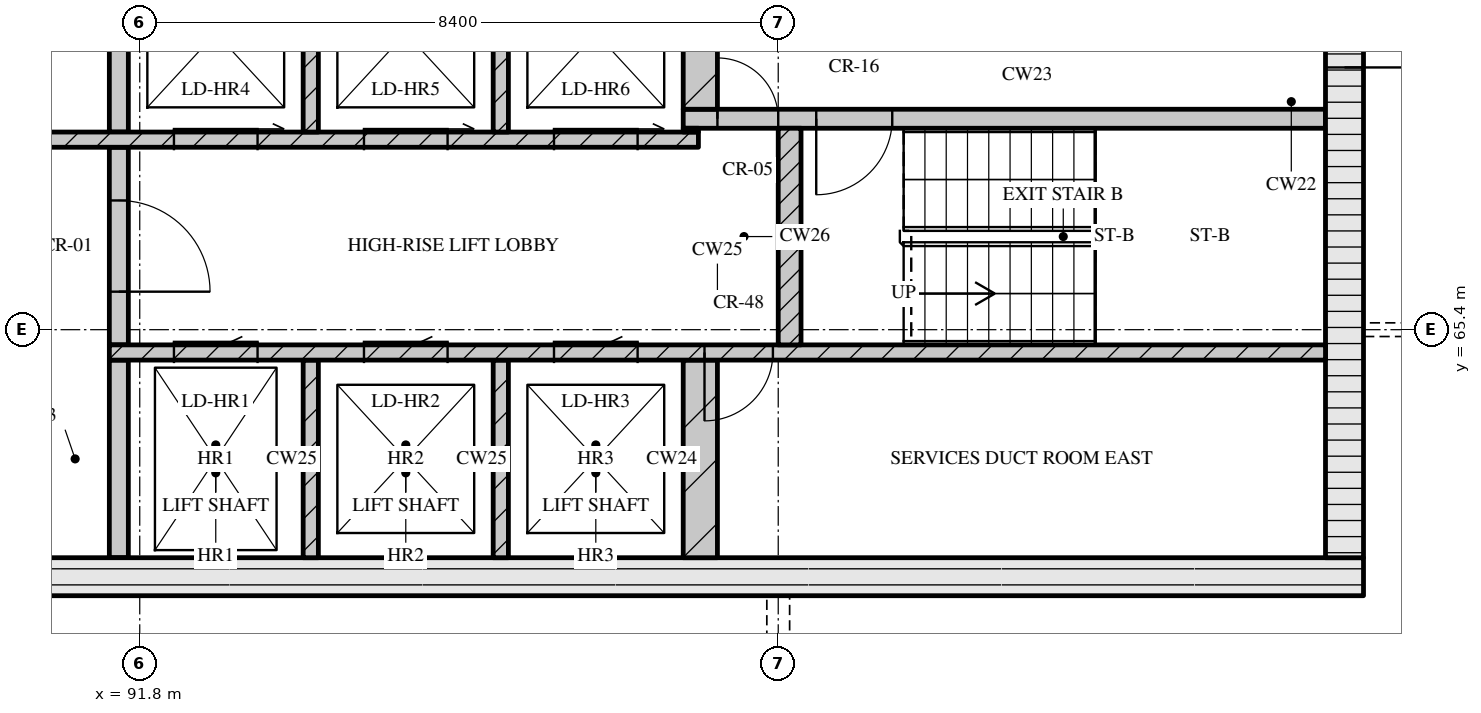
"""IFC4 building model, lengths in metres.
Left out: names, types, materials, properties, quantities, classifications, styles, units other than length and angle.
Written with IfcOpenShell. Run it as: python <this file> out.ifc"""

import sys

from ifc_helpers import new_model, si_unit, direction, frame, frame_2d, origin, place, context, subcontext, project, spatial, rectangle, extrude, element, fill, save


model = new_model("IFC4")
c1 = context("Model", 3, precision=1e-05, world=origin(), true_north=direction((0.0, 1.0)))
c2 = subcontext(c1, "Body", "Model", "MODEL_VIEW")
j1 = project(units=[si_unit("LENGTHUNIT", "METRE"), si_unit("PLANEANGLEUNIT", "RADIAN")], contexts=[c1])
p1 = place(None, origin())
s1 = spatial("IfcSite", under=j1, at=p1, CompositionType="ELEMENT")
p2 = place(p1, origin())
s2 = spatial("IfcBuilding", under=s1, at=p2, CompositionType="ELEMENT")
p3 = place(p2, frame((0.0, 0.0, 303.15)))
s3 = spatial("IfcBuildingStorey", under=s2, at=p3, CompositionType="ELEMENT", Elevation=303.15)
p4 = place(p3, frame((67.3, 62.15, 0.0), z_axis=(0.0, 0.0, 1.0), x_axis=(1.0, 0.0, 0.0)))
e1 = element("IfcWall", 1, at=p4, inside=s3, PredefinedType="SOLIDWALL", context=c2, shape_type="SweptSolid", body=[
    extrude(rectangle(XDim=40.6, YDim=0.5, at=frame_2d((20.3, 0.0))), origin(), (0.0, 0.0, 1.0), 3.32),
])
p5 = place(p4, frame((20.65, 0.0, 0.0)))
e2 = element("IfcOpeningElement", 2, at=p5, cuts=e1, PredefinedType="OPENING", context=c2, shape_type="SweptSolid", body=[
    extrude(rectangle(XDim=1.8, YDim=2.1, at=frame_2d((0.9, 1.05))), frame((0.0, 0.26, 0.0), z_axis=(0.0, -1.0, 0.0), x_axis=(1.0, 0.0, 0.0)), (0.0, 0.0, 1.0), 0.52),
])
p6 = place(p3, frame((107.65, 62.4, 0.0), z_axis=(0.0, 0.0, 1.0), x_axis=(0.0, 1.0, 0.0)))
e3 = element("IfcWall", 3, at=p6, inside=s3, PredefinedType="SOLIDWALL", context=c2, shape_type="SweptSolid", body=[
    extrude(rectangle(XDim=12.0, YDim=0.5, at=frame_2d((6.0, 0.0))), origin(), (0.0, 0.0, 1.0), 3.32),
])
p7 = place(p6, frame((6.45, 0.0, 0.0)))
e4 = element("IfcOpeningElement", 4, at=p7, cuts=e3, PredefinedType="OPENING", context=c2, shape_type="SweptSolid", body=[
    extrude(rectangle(XDim=1.2, YDim=2.1, at=frame_2d((0.6, 1.05))), frame((0.0, 0.26, 0.0), z_axis=(0.0, -1.0, 0.0), x_axis=(1.0, 0.0, 0.0)), (0.0, 0.0, 1.0), 0.52),
])
p8 = place(p3, frame((91.525, 62.4, 0.0), z_axis=(0.0, 0.0, 1.0), x_axis=(0.0, 1.0, 0.0)))
e5 = element("IfcWall", 5, at=p8, inside=s3, PredefinedType="SOLIDWALL", context=c2, shape_type="SweptSolid", body=[
    extrude(rectangle(XDim=2.6, YDim=0.25, at=frame_2d((1.3, 0.0))), origin(), (0.0, 0.0, 1.0), 3.32),
])
for number, where, z_axis, x_axis in (
    (6, (94.05, 62.4, 0.0), (0.0, 0.0, 1.0), (0.0, 1.0, 0.0)),
    (7, (96.55, 62.4, 0.0), (0.0, 0.0, 1.0), (0.0, 1.0, 0.0)),
):
    element("IfcWall", number, at=place(p3, frame(where, z_axis=z_axis, x_axis=x_axis)), inside=s3, PredefinedType="SOLIDWALL", context=c2, shape_type="SweptSolid", body=[
        extrude(rectangle(XDim=2.6, YDim=0.2, at=frame_2d((1.3, 0.0))), origin(), (0.0, 0.0, 1.0), 3.32),
    ])
p9 = place(p3, frame((99.175, 62.4, 0.0), z_axis=(0.0, 0.0, 1.0), x_axis=(0.0, 1.0, 0.0)))
e8 = element("IfcWall", 8, at=p9, inside=s3, PredefinedType="SOLIDWALL", context=c2, shape_type="SweptSolid", body=[
    extrude(rectangle(XDim=2.6, YDim=0.45, at=frame_2d((1.3, 0.0))), origin(), (0.0, 0.0, 1.0), 3.32),
])
p10 = place(p3, frame((91.4, 65.1, 0.0), z_axis=(0.0, 0.0, 1.0), x_axis=(1.0, 0.0, 0.0)))
e9 = element("IfcWall", 9, at=p10, inside=s3, PredefinedType="SOLIDWALL", context=c2, shape_type="SweptSolid", body=[
    extrude(rectangle(XDim=16.0, YDim=0.2, at=frame_2d((8.0, 0.0))), origin(), (0.0, 0.0, 1.0), 3.32),
])
p11 = place(p10, frame((0.85, 0.0, 0.0)))
e10 = element("IfcOpeningElement", 10, at=p11, cuts=e9, PredefinedType="OPENING", context=c2, shape_type="SweptSolid", body=[
    extrude(rectangle(XDim=1.1, YDim=2.1, at=frame_2d((0.55, 1.05))), frame((0.0, 0.11, 0.0), z_axis=(0.0, -1.0, 0.0), x_axis=(1.0, 0.0, 0.0)), (0.0, 0.0, 1.0), 0.22),
])
p12 = place(p10, frame((3.35, 0.0, 0.0)))
e11 = element("IfcOpeningElement", 11, at=p12, cuts=e9, PredefinedType="OPENING", context=c2, shape_type="SweptSolid", body=[
    extrude(rectangle(XDim=1.1, YDim=2.1, at=frame_2d((0.55, 1.05))), frame((0.0, 0.11, 0.0), z_axis=(0.0, -1.0, 0.0), x_axis=(1.0, 0.0, 0.0)), (0.0, 0.0, 1.0), 0.22),
])
p13 = place(p10, frame((5.85, 0.0, 0.0)))
e12 = element("IfcOpeningElement", 12, at=p13, cuts=e9, PredefinedType="OPENING", context=c2, shape_type="SweptSolid", body=[
    extrude(rectangle(XDim=1.1, YDim=2.1, at=frame_2d((0.55, 1.05))), frame((0.0, 0.11, 0.0), z_axis=(0.0, -1.0, 0.0), x_axis=(1.0, 0.0, 0.0)), (0.0, 0.0, 1.0), 0.22),
])
p14 = place(p10, frame((7.83, 0.0, 0.0)))
e13 = element("IfcOpeningElement", 13, at=p14, cuts=e9, PredefinedType="OPENING", context=c2, shape_type="SweptSolid", body=[
    extrude(rectangle(XDim=0.9, YDim=2.1, at=frame_2d((0.45, 1.05))), frame((0.0, 0.11, 0.0), z_axis=(0.0, -1.0, 0.0), x_axis=(1.0, 0.0, 0.0)), (0.0, 0.0, 1.0), 0.22),
])
p15 = place(p3, frame((91.525, 65.2, 0.0), z_axis=(0.0, 0.0, 1.0), x_axis=(0.0, 1.0, 0.0)))
e14 = element("IfcWall", 14, at=p15, inside=s3, PredefinedType="SOLIDWALL", context=c2, shape_type="SweptSolid", body=[
    extrude(rectangle(XDim=2.6, YDim=0.25, at=frame_2d((1.3, 0.0))), origin(), (0.0, 0.0, 1.0), 3.32),
])
p16 = place(p15, frame((0.7, 0.0, 0.0)))
e15 = element("IfcOpeningElement", 15, at=p16, cuts=e14, PredefinedType="OPENING", context=c2, shape_type="SweptSolid", body=[
    extrude(rectangle(XDim=1.2, YDim=2.1, at=frame_2d((0.6, 1.05))), frame((0.0, 0.135, 0.0), z_axis=(0.0, -1.0, 0.0), x_axis=(1.0, 0.0, 0.0)), (0.0, 0.0, 1.0), 0.27),
])
p17 = place(p3, frame((100.35, 65.2, 0.0), z_axis=(0.0, 0.0, 1.0), x_axis=(0.0, 1.0, 0.0)))
e16 = element("IfcWall", 16, at=p17, inside=s3, PredefinedType="SOLIDWALL", context=c2, shape_type="SweptSolid", body=[
    extrude(rectangle(XDim=2.85, YDim=0.3, at=frame_2d((1.425, 0.0))), origin(), (0.0, 0.0, 1.0), 3.32),
])
p18 = place(p3, frame((76.05, 67.9, 0.0), z_axis=(0.0, 0.0, 1.0), x_axis=(1.0, 0.0, 0.0)))
e17 = element("IfcWall", 17, at=p18, inside=s3, PredefinedType="SOLIDWALL", context=c2, shape_type="SweptSolid", body=[
    extrude(rectangle(XDim=23.1, YDim=0.2, at=frame_2d((11.55, 0.0))), origin(), (0.0, 0.0, 1.0), 3.32),
])
p19 = place(p18, frame((1.4, 0.0, 0.0)))
e18 = element("IfcOpeningElement", 18, at=p19, cuts=e17, PredefinedType="OPENING", context=c2, shape_type="SweptSolid", body=[
    extrude(rectangle(XDim=0.9, YDim=2.1, at=frame_2d((0.45, 1.05))), frame((0.0, 0.11, 0.0), z_axis=(0.0, -1.0, 0.0), x_axis=(1.0, 0.0, 0.0)), (0.0, 0.0, 1.0), 0.22),
])
p20 = place(p18, frame((5.11, 0.0, 0.0)))
e19 = element("IfcOpeningElement", 19, at=p20, cuts=e17, PredefinedType="OPENING", context=c2, shape_type="SweptSolid", body=[
    extrude(rectangle(XDim=0.9, YDim=2.1, at=frame_2d((0.45, 1.05))), frame((0.0, 0.11, 0.0), z_axis=(0.0, -1.0, 0.0), x_axis=(1.0, 0.0, 0.0)), (0.0, 0.0, 1.0), 0.22),
])
p21 = place(p18, frame((8.45, 0.0, 0.0)))
e20 = element("IfcOpeningElement", 20, at=p21, cuts=e17, PredefinedType="OPENING", context=c2, shape_type="SweptSolid", body=[
    extrude(rectangle(XDim=0.9, YDim=2.1, at=frame_2d((0.45, 1.05))), frame((0.0, 0.11, 0.0), z_axis=(0.0, -1.0, 0.0), x_axis=(1.0, 0.0, 0.0)), (0.0, 0.0, 1.0), 0.22),
])
p22 = place(p18, frame((10.91, 0.0, 0.0)))
e21 = element("IfcOpeningElement", 21, at=p22, cuts=e17, PredefinedType="OPENING", context=c2, shape_type="SweptSolid", body=[
    extrude(rectangle(XDim=0.9, YDim=2.1, at=frame_2d((0.45, 1.05))), frame((0.0, 0.11, 0.0), z_axis=(0.0, -1.0, 0.0), x_axis=(1.0, 0.0, 0.0)), (0.0, 0.0, 1.0), 0.22),
])
p23 = place(p18, frame((13.55, 0.0, 0.0)))
e22 = element("IfcOpeningElement", 22, at=p23, cuts=e17, PredefinedType="OPENING", context=c2, shape_type="SweptSolid", body=[
    extrude(rectangle(XDim=1.0, YDim=2.1, at=frame_2d((0.5, 1.05))), frame((0.0, 0.11, 0.0), z_axis=(0.0, -1.0, 0.0), x_axis=(1.0, 0.0, 0.0)), (0.0, 0.0, 1.0), 0.22),
])
p24 = place(p18, frame((16.2, 0.0, 0.0)))
e23 = element("IfcOpeningElement", 23, at=p24, cuts=e17, PredefinedType="OPENING", context=c2, shape_type="SweptSolid", body=[
    extrude(rectangle(XDim=1.1, YDim=2.1, at=frame_2d((0.55, 1.05))), frame((0.0, 0.11, 0.0), z_axis=(0.0, -1.0, 0.0), x_axis=(1.0, 0.0, 0.0)), (0.0, 0.0, 1.0), 0.22),
])
p25 = place(p18, frame((18.7, 0.0, 0.0)))
e24 = element("IfcOpeningElement", 24, at=p25, cuts=e17, PredefinedType="OPENING", context=c2, shape_type="SweptSolid", body=[
    extrude(rectangle(XDim=1.1, YDim=2.1, at=frame_2d((0.55, 1.05))), frame((0.0, 0.11, 0.0), z_axis=(0.0, -1.0, 0.0), x_axis=(1.0, 0.0, 0.0)), (0.0, 0.0, 1.0), 0.22),
])
p26 = place(p18, frame((21.2, 0.0, 0.0)))
e25 = element("IfcOpeningElement", 25, at=p26, cuts=e17, PredefinedType="OPENING", context=c2, shape_type="SweptSolid", body=[
    extrude(rectangle(XDim=1.1, YDim=2.1, at=frame_2d((0.55, 1.05))), frame((0.0, 0.11, 0.0), z_axis=(0.0, -1.0, 0.0), x_axis=(1.0, 0.0, 0.0)), (0.0, 0.0, 1.0), 0.22),
])
p27 = place(p3, frame((91.525, 68.0, 0.0), z_axis=(0.0, 0.0, 1.0), x_axis=(0.0, 1.0, 0.0)))
e26 = element("IfcWall", 26, at=p27, inside=s3, PredefinedType="SOLIDWALL", context=c2, shape_type="SweptSolid", body=[
    extrude(rectangle(XDim=2.6, YDim=0.25, at=frame_2d((1.3, 0.0))), origin(), (0.0, 0.0, 1.0), 3.32),
])
for number, where, z_axis, x_axis in (
    (27, (94.05, 68.0, 0.0), (0.0, 0.0, 1.0), (0.0, 1.0, 0.0)),
    (28, (96.55, 68.0, 0.0), (0.0, 0.0, 1.0), (0.0, 1.0, 0.0)),
):
    element("IfcWall", number, at=place(p3, frame(where, z_axis=z_axis, x_axis=x_axis)), inside=s3, PredefinedType="SOLIDWALL", context=c2, shape_type="SweptSolid", body=[
        extrude(rectangle(XDim=2.6, YDim=0.2, at=frame_2d((1.3, 0.0))), origin(), (0.0, 0.0, 1.0), 3.32),
    ])
p28 = place(p3, frame((98.95, 68.025, 0.0), z_axis=(0.0, 0.0, 1.0), x_axis=(1.0, 0.0, 0.0)))
e29 = element("IfcWall", 29, at=p28, inside=s3, PredefinedType="SOLIDWALL", context=c2, shape_type="SweptSolid", body=[
    extrude(rectangle(XDim=0.2, YDim=0.05, at=frame_2d((0.1, 0.0))), origin(), (0.0, 0.0, 1.0), 3.32),
])
p29 = place(p3, frame((98.95, 68.175, 0.0), z_axis=(0.0, 0.0, 1.0), x_axis=(1.0, 0.0, 0.0)))
e30 = element("IfcWall", 30, at=p29, inside=s3, PredefinedType="SOLIDWALL", context=c2, shape_type="SweptSolid", body=[
    extrude(rectangle(XDim=8.45, YDim=0.25, at=frame_2d((4.225, 0.0))), origin(), (0.0, 0.0, 1.0), 3.32),
])
p30 = place(p29, frame((0.45, 0.0, 0.0)))
e31 = element("IfcOpeningElement", 31, at=p30, cuts=e30, PredefinedType="OPENING", context=c2, shape_type="SweptSolid", body=[
    extrude(rectangle(XDim=0.8, YDim=2.1, at=frame_2d((0.4, 1.05))), frame((0.0, 0.135, 0.0), z_axis=(0.0, -1.0, 0.0), x_axis=(1.0, 0.0, 0.0)), (0.0, 0.0, 1.0), 0.27),
])
p31 = place(p29, frame((1.75, 0.0, 0.0)))
e32 = element("IfcOpeningElement", 32, at=p31, cuts=e30, PredefinedType="OPENING", context=c2, shape_type="SweptSolid", body=[
    extrude(rectangle(XDim=1.0, YDim=2.1, at=frame_2d((0.5, 1.05))), frame((0.0, 0.135, 0.0), z_axis=(0.0, -1.0, 0.0), x_axis=(1.0, 0.0, 0.0)), (0.0, 0.0, 1.0), 0.27),
])
p32 = place(p3, frame((99.175, 68.3, 0.0), z_axis=(0.0, 0.0, 1.0), x_axis=(0.0, 1.0, 0.0)))
e33 = element("IfcWall", 33, at=p32, inside=s3, PredefinedType="SOLIDWALL", context=c2, shape_type="SweptSolid", body=[
    extrude(rectangle(XDim=2.3, YDim=0.45, at=frame_2d((1.15, 0.0))), origin(), (0.0, 0.0, 1.0), 3.32),
])
p33 = place(p11, origin())
e34 = element("IfcDoor", 34, at=p33, inside=s3, OperationType="SLIDING_TO_LEFT", PredefinedType="DOOR", context=c2, shape_type="SweptSolid", body=[
    extrude(rectangle(XDim=1.1, YDim=2.1, at=frame_2d((0.55, 1.05))), frame((0.0, 0.025, 0.0), z_axis=(0.0, -1.0, 0.0), x_axis=(1.0, 0.0, 0.0)), (0.0, 0.0, 1.0), 0.05),
])
fill(e10, e34)
p34 = place(p12, origin())
e35 = element("IfcDoor", 35, at=p34, inside=s3, OperationType="SLIDING_TO_LEFT", PredefinedType="DOOR", context=c2, shape_type="SweptSolid", body=[
    extrude(rectangle(XDim=1.1, YDim=2.1, at=frame_2d((0.55, 1.05))), frame((0.0, 0.025, 0.0), z_axis=(0.0, -1.0, 0.0), x_axis=(1.0, 0.0, 0.0)), (0.0, 0.0, 1.0), 0.05),
])
fill(e11, e35)
p35 = place(p13, origin())
e36 = element("IfcDoor", 36, at=p35, inside=s3, OperationType="SLIDING_TO_LEFT", PredefinedType="DOOR", context=c2, shape_type="SweptSolid", body=[
    extrude(rectangle(XDim=1.1, YDim=2.1, at=frame_2d((0.55, 1.05))), frame((0.0, 0.025, 0.0), z_axis=(0.0, -1.0, 0.0), x_axis=(1.0, 0.0, 0.0)), (0.0, 0.0, 1.0), 0.05),
])
fill(e12, e36)
p36 = place(p14, origin())
e37 = element("IfcDoor", 37, at=p36, inside=s3, OperationType="SINGLE_SWING_RIGHT", PredefinedType="DOOR", context=c2, shape_type="SweptSolid", body=[
    extrude(rectangle(XDim=0.9, YDim=2.1, at=frame_2d((0.45, 1.05))), frame((0.0, 0.025, 0.0), z_axis=(0.0, -1.0, 0.0), x_axis=(1.0, 0.0, 0.0)), (0.0, 0.0, 1.0), 0.05),
])
fill(e13, e37)
p37 = place(p16, origin())
e38 = element("IfcDoor", 38, at=p37, inside=s3, OperationType="SINGLE_SWING_RIGHT", PredefinedType="DOOR", context=c2, shape_type="SweptSolid", body=[
    extrude(rectangle(XDim=1.2, YDim=2.1, at=frame_2d((0.6, 1.05))), frame((0.0, 0.025, 0.0), z_axis=(0.0, -1.0, 0.0), x_axis=(1.0, 0.0, 0.0)), (0.0, 0.0, 1.0), 0.05),
])
fill(e15, e38)
p38 = place(p24, origin())
e39 = element("IfcDoor", 39, at=p38, inside=s3, OperationType="SLIDING_TO_RIGHT", PredefinedType="DOOR", context=c2, shape_type="SweptSolid", body=[
    extrude(rectangle(XDim=1.1, YDim=2.1, at=frame_2d((0.55, 1.05))), frame((0.0, 0.025, 0.0), z_axis=(0.0, -1.0, 0.0), x_axis=(1.0, 0.0, 0.0)), (0.0, 0.0, 1.0), 0.05),
])
fill(e23, e39)
p39 = place(p25, origin())
e40 = element("IfcDoor", 40, at=p39, inside=s3, OperationType="SLIDING_TO_RIGHT", PredefinedType="DOOR", context=c2, shape_type="SweptSolid", body=[
    extrude(rectangle(XDim=1.1, YDim=2.1, at=frame_2d((0.55, 1.05))), frame((0.0, 0.025, 0.0), z_axis=(0.0, -1.0, 0.0), x_axis=(1.0, 0.0, 0.0)), (0.0, 0.0, 1.0), 0.05),
])
fill(e24, e40)
p40 = place(p26, origin())
e41 = element("IfcDoor", 41, at=p40, inside=s3, OperationType="SLIDING_TO_RIGHT", PredefinedType="DOOR", context=c2, shape_type="SweptSolid", body=[
    extrude(rectangle(XDim=1.1, YDim=2.1, at=frame_2d((0.55, 1.05))), frame((0.0, 0.025, 0.0), z_axis=(0.0, -1.0, 0.0), x_axis=(1.0, 0.0, 0.0)), (0.0, 0.0, 1.0), 0.05),
])
fill(e25, e41)
p41 = place(p30, origin())
e42 = element("IfcDoor", 42, at=p41, inside=s3, OperationType="SINGLE_SWING_LEFT", PredefinedType="DOOR", context=c2, shape_type="SweptSolid", body=[
    extrude(rectangle(XDim=0.8, YDim=2.1, at=frame_2d((0.4, 1.05))), frame((0.0, 0.025, 0.0), z_axis=(0.0, -1.0, 0.0), x_axis=(1.0, 0.0, 0.0)), (0.0, 0.0, 1.0), 0.05),
])
fill(e31, e42)
p42 = place(p31, origin())
e43 = element("IfcDoor", 43, at=p42, inside=s3, OperationType="SINGLE_SWING_RIGHT", PredefinedType="DOOR", context=c2, shape_type="SweptSolid", body=[
    extrude(rectangle(XDim=1.0, YDim=2.1, at=frame_2d((0.5, 1.05))), frame((0.0, 0.025, 0.0), z_axis=(0.0, -1.0, 0.0), x_axis=(1.0, 0.0, 0.0)), (0.0, 0.0, 1.0), 0.05),
])
fill(e32, e43)
p43 = place(p7, origin())
e44 = element("IfcDoor", 44, at=p43, inside=s3, OperationType="SINGLE_SWING_RIGHT", PredefinedType="DOOR", context=c2, shape_type="SweptSolid", body=[
    extrude(rectangle(XDim=1.2, YDim=2.1, at=frame_2d((0.6, 1.05))), frame((0.0, 0.025, 0.0), z_axis=(0.0, -1.0, 0.0), x_axis=(1.0, 0.0, 0.0)), (0.0, 0.0, 1.0), 0.05),
])
fill(e4, e44)
save(model, sys.argv[1])
